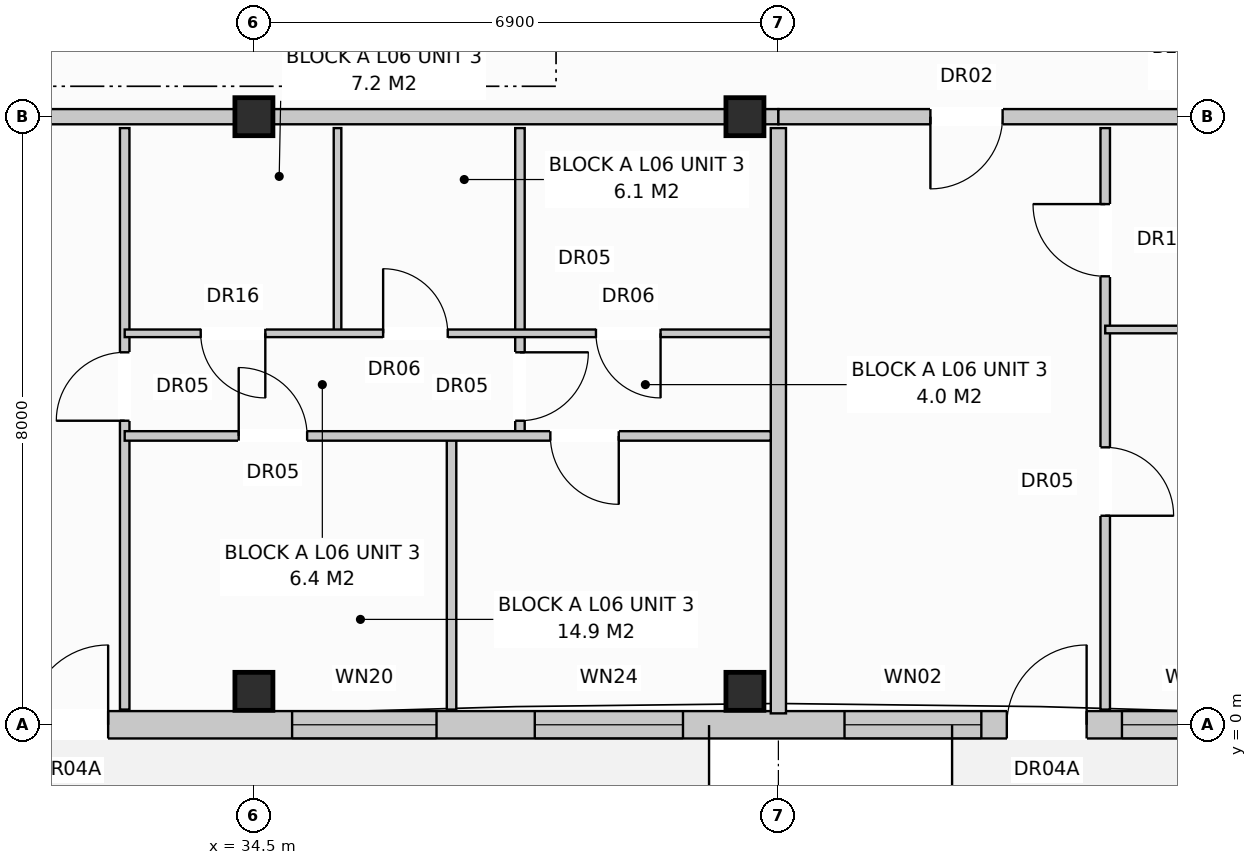
"""IFC4 building model, lengths in metres.
Left out: names, types, materials, properties, quantities, classifications, styles, units other than length and angle.
Written with IfcOpenShell. Run it as: python <this file> out.ifc"""

import sys

from ifc_helpers import new_model, si_unit, direction, frame, frame_2d, origin, origin_with_axes, origin_2d, place, context, subcontext, project, spatial, rectangle, extrude, element, fill, save


model = new_model("IFC4")
c1 = context("Model", 3, precision=1e-05, world=origin(), true_north=direction((0.0, 1.0)))
c2 = subcontext(c1, "Body", "Model", "MODEL_VIEW")
j1 = project(units=[si_unit("LENGTHUNIT", "METRE"), si_unit("PLANEANGLEUNIT", "RADIAN")], contexts=[c1])
p1 = place(None, origin())
s1 = spatial("IfcSite", under=j1, at=p1, CompositionType="ELEMENT")
p2 = place(p1, origin())
s2 = spatial("IfcBuilding", under=s1, at=p2, CompositionType="ELEMENT")
p3 = place(p2, frame((0.0, 0.0, 20.8)))
s3 = spatial("IfcBuildingStorey", under=s2, at=p3, CompositionType="ELEMENT", Elevation=20.8)
for number, where, z_axis, x_axis in (
    (1, (34.5, 0.44, 0.0), (0.0, 0.0, 1.0), (1.0, 0.0, 0.0)),
    (2, (34.5, 8.0, 0.0), (0.0, 0.0, 1.0), (1.0, 0.0, 0.0)),
    (3, (40.96, 0.44, 0.0), (0.0, 0.0, 1.0), (1.0, 0.0, 0.0)),
    (4, (40.96, 8.0, 0.0), (0.0, 0.0, 1.0), (1.0, 0.0, 0.0)),
):
    element("IfcColumn", number, at=place(p3, frame(where, z_axis=z_axis, x_axis=x_axis)), inside=s3, PredefinedType="COLUMN", context=c2, shape_type="SweptSolid", body=[
        extrude(rectangle(XDim=0.5, YDim=0.5, at=origin_2d()), origin(), (0.0, 0.0, 1.0), 3.2),
    ])
p4 = place(p3, frame((0.17, 0.0, 0.0), z_axis=(0.0, 0.0, 1.0), x_axis=(1.0, 0.0, 0.0)))
e5 = element("IfcWall", 5, at=p4, inside=s3, PredefinedType="STANDARD", context=c2, shape_type="SweptSolid", body=[
    extrude(rectangle(XDim=54.86, YDim=0.36, at=frame_2d((27.43, 0.0))), origin(), (0.0, 0.0, 1.0), 2.95),
])
p5 = place(p4, frame((4.862, 0.0, 0.0)))
e6 = element("IfcOpeningElement", 6, at=p5, cuts=e5, PredefinedType="OPENING", context=c2, shape_type="SweptSolid", body=[
    extrude(rectangle(XDim=1.05, YDim=2.12, at=frame_2d((0.525, 1.06))), frame((0.0, 0.192, 0.0), z_axis=(0.0, -1.0, 0.0), x_axis=(1.0, 0.0, 0.0)), (0.0, 0.0, 1.0), 0.384),
])
p6 = place(p4, frame((15.262, 0.0, 0.0)))
e7 = element("IfcOpeningElement", 7, at=p6, cuts=e5, PredefinedType="OPENING", context=c2, shape_type="SweptSolid", body=[
    extrude(rectangle(XDim=1.05, YDim=2.12, at=frame_2d((0.525, 1.06))), frame((0.0, 0.192, 0.0), z_axis=(0.0, -1.0, 0.0), x_axis=(1.0, 0.0, 0.0)), (0.0, 0.0, 1.0), 0.384),
])
p7 = place(p4, frame((31.362, 0.0, 0.0)))
e8 = element("IfcOpeningElement", 8, at=p7, cuts=e5, PredefinedType="OPENING", context=c2, shape_type="SweptSolid", body=[
    extrude(rectangle(XDim=1.05, YDim=2.12, at=frame_2d((0.525, 1.06))), frame((0.0, 0.192, 0.0), z_axis=(0.0, -1.0, 0.0), x_axis=(1.0, 0.0, 0.0)), (0.0, 0.0, 1.0), 0.384),
])
p8 = place(p4, frame((44.235, 0.0, 0.0)))
e9 = element("IfcOpeningElement", 9, at=p8, cuts=e5, PredefinedType="OPENING", context=c2, shape_type="SweptSolid", body=[
    extrude(rectangle(XDim=1.05, YDim=2.12, at=frame_2d((0.525, 1.06))), frame((0.0, 0.192, 0.0), z_axis=(0.0, -1.0, 0.0), x_axis=(1.0, 0.0, 0.0)), (0.0, 0.0, 1.0), 0.384),
])
p9 = place(p4, frame((2.1, 0.0, 0.8)))
e10 = element("IfcOpeningElement", 10, at=p9, cuts=e5, PredefinedType="OPENING", context=c2, shape_type="SweptSolid", body=[
    extrude(rectangle(XDim=1.8, YDim=1.7, at=frame_2d((0.9, 0.85))), frame((0.0, 0.192, 0.0), z_axis=(0.0, -1.0, 0.0), x_axis=(1.0, 0.0, 0.0)), (0.0, 0.0, 1.0), 0.384),
])
p10 = place(p4, frame((7.75, 0.0, 0.72)))
e11 = element("IfcOpeningElement", 11, at=p10, cuts=e5, PredefinedType="OPENING", context=c2, shape_type="SweptSolid", body=[
    extrude(rectangle(XDim=1.9, YDim=1.85, at=frame_2d((0.95, 0.925))), frame((0.0, 0.192, 0.0), z_axis=(0.0, -1.0, 0.0), x_axis=(1.0, 0.0, 0.0)), (0.0, 0.0, 1.0), 0.384),
])
p11 = place(p4, frame((11.8, 0.0, 0.72)))
e12 = element("IfcOpeningElement", 12, at=p11, cuts=e5, PredefinedType="OPENING", context=c2, shape_type="SweptSolid", body=[
    extrude(rectangle(XDim=1.1, YDim=1.5, at=frame_2d((0.55, 0.75))), frame((0.0, 0.192, 0.0), z_axis=(0.0, -1.0, 0.0), x_axis=(1.0, 0.0, 0.0)), (0.0, 0.0, 1.0), 0.384),
])
p12 = place(p4, frame((17.6, 0.0, 0.8)))
e13 = element("IfcOpeningElement", 13, at=p12, cuts=e5, PredefinedType="OPENING", context=c2, shape_type="SweptSolid", body=[
    extrude(rectangle(XDim=1.8, YDim=1.7, at=frame_2d((0.9, 0.85))), frame((0.0, 0.192, 0.0), z_axis=(0.0, -1.0, 0.0), x_axis=(1.0, 0.0, 0.0)), (0.0, 0.0, 1.0), 0.384),
])
p13 = place(p4, frame((21.55, 0.0, 0.72)))
e14 = element("IfcOpeningElement", 14, at=p13, cuts=e5, PredefinedType="OPENING", context=c2, shape_type="SweptSolid", body=[
    extrude(rectangle(XDim=1.9, YDim=1.85, at=frame_2d((0.95, 0.925))), frame((0.0, 0.192, 0.0), z_axis=(0.0, -1.0, 0.0), x_axis=(1.0, 0.0, 0.0)), (0.0, 0.0, 1.0), 0.384),
])
p14 = place(p4, frame((25.35, 0.0, 0.72)))
e15 = element("IfcOpeningElement", 15, at=p14, cuts=e5, PredefinedType="OPENING", context=c2, shape_type="SweptSolid", body=[
    extrude(rectangle(XDim=1.1, YDim=1.5, at=frame_2d((0.55, 0.75))), frame((0.0, 0.192, 0.0), z_axis=(0.0, -1.0, 0.0), x_axis=(1.0, 0.0, 0.0)), (0.0, 0.0, 1.0), 0.384),
])
p15 = place(p4, frame((29.2, 0.0, 0.8)))
e16 = element("IfcOpeningElement", 16, at=p15, cuts=e5, PredefinedType="OPENING", context=c2, shape_type="SweptSolid", body=[
    extrude(rectangle(XDim=1.8, YDim=1.7, at=frame_2d((0.9, 0.85))), frame((0.0, 0.192, 0.0), z_axis=(0.0, -1.0, 0.0), x_axis=(1.0, 0.0, 0.0)), (0.0, 0.0, 1.0), 0.384),
])
p16 = place(p4, frame((34.833, 0.0, 0.72)))
e17 = element("IfcOpeningElement", 17, at=p16, cuts=e5, PredefinedType="OPENING", context=c2, shape_type="SweptSolid", body=[
    extrude(rectangle(XDim=1.9, YDim=1.85, at=frame_2d((0.95, 0.925))), frame((0.0, 0.192, 0.0), z_axis=(0.0, -1.0, 0.0), x_axis=(1.0, 0.0, 0.0)), (0.0, 0.0, 1.0), 0.384),
])
p17 = place(p4, frame((38.025, 0.0, 0.8)))
e18 = element("IfcOpeningElement", 18, at=p17, cuts=e5, PredefinedType="OPENING", context=c2, shape_type="SweptSolid", body=[
    extrude(rectangle(XDim=1.95, YDim=1.65, at=frame_2d((0.975, 0.825))), frame((0.0, 0.192, 0.0), z_axis=(0.0, -1.0, 0.0), x_axis=(1.0, 0.0, 0.0)), (0.0, 0.0, 1.0), 0.384),
])
p18 = place(p4, frame((42.1, 0.0, 0.8)))
e19 = element("IfcOpeningElement", 19, at=p18, cuts=e5, PredefinedType="OPENING", context=c2, shape_type="SweptSolid", body=[
    extrude(rectangle(XDim=1.8, YDim=1.7, at=frame_2d((0.9, 0.85))), frame((0.0, 0.192, 0.0), z_axis=(0.0, -1.0, 0.0), x_axis=(1.0, 0.0, 0.0)), (0.0, 0.0, 1.0), 0.384),
])
p19 = place(p4, frame((45.75, 0.0, 0.72)))
e20 = element("IfcOpeningElement", 20, at=p19, cuts=e5, PredefinedType="OPENING", context=c2, shape_type="SweptSolid", body=[
    extrude(rectangle(XDim=1.9, YDim=1.85, at=frame_2d((0.95, 0.925))), frame((0.0, 0.192, 0.0), z_axis=(0.0, -1.0, 0.0), x_axis=(1.0, 0.0, 0.0)), (0.0, 0.0, 1.0), 0.384),
])
p20 = place(p4, frame((49.125, 0.0, 0.8)))
e21 = element("IfcOpeningElement", 21, at=p20, cuts=e5, PredefinedType="OPENING", context=c2, shape_type="SweptSolid", body=[
    extrude(rectangle(XDim=1.95, YDim=1.65, at=frame_2d((0.975, 0.825))), frame((0.0, 0.192, 0.0), z_axis=(0.0, -1.0, 0.0), x_axis=(1.0, 0.0, 0.0)), (0.0, 0.0, 1.0), 0.384),
])
p21 = place(p4, frame((52.415, 0.0, 0.8)))
e22 = element("IfcOpeningElement", 22, at=p21, cuts=e5, PredefinedType="OPENING", context=c2, shape_type="SweptSolid", body=[
    extrude(rectangle(XDim=1.8, YDim=1.7, at=frame_2d((0.9, 0.85))), frame((0.0, 0.192, 0.0), z_axis=(0.0, -1.0, 0.0), x_axis=(1.0, 0.0, 0.0)), (0.0, 0.0, 1.0), 0.384),
])
p22 = place(p3, frame((41.4, 7.85, 0.0), z_axis=(0.0, 0.0, 1.0), x_axis=(0.0, -1.0, 0.0)))
e23 = element("IfcWall", 23, at=p22, inside=s3, PredefinedType="PARTITIONING", context=c2, shape_type="SweptSolid", body=[
    extrude(rectangle(XDim=7.7, YDim=0.2, at=frame_2d((3.85, 0.0))), origin(), (0.0, 0.0, 1.0), 2.95),
])
p23 = place(p3, frame((27.6, 8.0, 0.0), z_axis=(0.0, 0.0, 1.0), x_axis=(1.0, 0.0, 0.0)))
e24 = element("IfcWall", 24, at=p23, inside=s3, PredefinedType="PARTITIONING", context=c2, shape_type="SweptSolid", body=[
    extrude(rectangle(XDim=13.8, YDim=0.2, at=frame_2d((6.9, 0.0))), origin(), (0.0, 0.0, 1.0), 2.39),
])
p24 = place(p23, frame((2.4, 0.0, 0.0)))
e25 = element("IfcOpeningElement", 25, at=p24, cuts=e24, PredefinedType="OPENING", context=c2, shape_type="SweptSolid", body=[
    extrude(rectangle(XDim=0.95, YDim=2.15, at=frame_2d((0.475, 1.075))), frame((0.0, 0.112, 0.0), z_axis=(0.0, -1.0, 0.0), x_axis=(1.0, 0.0, 0.0)), (0.0, 0.0, 1.0), 0.224),
])
p25 = place(p3, frame((32.8, 7.85, 0.0), z_axis=(0.0, 0.0, 1.0), x_axis=(0.0, -1.0, 0.0)))
e26 = element("IfcWall", 26, at=p25, inside=s3, PredefinedType="PARTITIONING", context=c2, shape_type="SweptSolid", body=[
    extrude(rectangle(XDim=7.65, YDim=0.125, at=frame_2d((3.825, 0.0))), origin(), (0.0, 0.0, 1.0), 2.95),
])
p26 = place(p25, frame((2.95, 0.0, 0.0)))
e27 = element("IfcOpeningElement", 27, at=p26, cuts=e26, PredefinedType="OPENING", context=c2, shape_type="SweptSolid", body=[
    extrude(rectangle(XDim=0.9, YDim=2.1, at=frame_2d((0.45, 1.05))), frame((0.0, 0.074, 0.0), z_axis=(0.0, -1.0, 0.0), x_axis=(1.0, 0.0, 0.0)), (0.0, 0.0, 1.0), 0.149),
])
p27 = place(p3, frame((35.6, 7.85, 0.0), z_axis=(0.0, 0.0, 1.0), x_axis=(0.0, -1.0, 0.0)))
e28 = element("IfcWall", 28, at=p27, inside=s3, PredefinedType="PARTITIONING", context=c2, shape_type="SweptSolid", body=[
    extrude(rectangle(XDim=2.7, YDim=0.1, at=frame_2d((1.35, 0.0))), origin(), (0.0, 0.0, 1.0), 2.95),
])
p28 = place(p3, frame((38.0, 7.85, 0.0), z_axis=(0.0, 0.0, 1.0), x_axis=(0.0, -1.0, 0.0)))
e29 = element("IfcWall", 29, at=p28, inside=s3, PredefinedType="PARTITIONING", context=c2, shape_type="SweptSolid", body=[
    extrude(rectangle(XDim=4.05, YDim=0.125, at=frame_2d((2.025, 0.0))), origin(), (0.0, 0.0, 1.0), 2.95),
])
p29 = place(p28, frame((2.95, 0.0, 0.0)))
e30 = element("IfcOpeningElement", 30, at=p29, cuts=e29, PredefinedType="OPENING", context=c2, shape_type="SweptSolid", body=[
    extrude(rectangle(XDim=0.9, YDim=2.1, at=frame_2d((0.45, 1.05))), frame((0.0, 0.074, 0.0), z_axis=(0.0, -1.0, 0.0), x_axis=(1.0, 0.0, 0.0)), (0.0, 0.0, 1.0), 0.149),
])
p30 = place(p3, frame((37.1, 3.8, 0.0), z_axis=(0.0, 0.0, 1.0), x_axis=(0.0, -1.0, 0.0)))
e31 = element("IfcWall", 31, at=p30, inside=s3, PredefinedType="PARTITIONING", context=c2, shape_type="SweptSolid", body=[
    extrude(rectangle(XDim=3.6, YDim=0.125, at=frame_2d((1.8, 0.0))), origin(), (0.0, 0.0, 1.0), 2.95),
])
p31 = place(p3, frame((32.8, 5.15, 0.0), z_axis=(0.0, 0.0, 1.0), x_axis=(1.0, 0.0, 0.0)))
e32 = element("IfcWall", 32, at=p31, inside=s3, PredefinedType="PARTITIONING", context=c2, shape_type="SweptSolid", body=[
    extrude(rectangle(XDim=8.5, YDim=0.1, at=frame_2d((4.25, 0.0))), origin(), (0.0, 0.0, 1.0), 2.95),
])
p32 = place(p31, frame((1.0, 0.0, 0.0)))
e33 = element("IfcOpeningElement", 33, at=p32, cuts=e32, PredefinedType="OPENING", context=c2, shape_type="SweptSolid", body=[
    extrude(rectangle(XDim=0.85, YDim=2.1, at=frame_2d((0.425, 1.05))), frame((0.0, 0.062, 0.0), z_axis=(0.0, -1.0, 0.0), x_axis=(1.0, 0.0, 0.0)), (0.0, 0.0, 1.0), 0.124),
])
p33 = place(p31, frame((3.4, 0.0, 0.0)))
e34 = element("IfcOpeningElement", 34, at=p33, cuts=e32, PredefinedType="OPENING", context=c2, shape_type="SweptSolid", body=[
    extrude(rectangle(XDim=0.85, YDim=2.05, at=frame_2d((0.425, 1.025))), frame((0.0, 0.062, 0.0), z_axis=(0.0, -1.0, 0.0), x_axis=(1.0, 0.0, 0.0)), (0.0, 0.0, 1.0), 0.124),
])
p34 = place(p31, frame((6.2, 0.0, 0.0)))
e35 = element("IfcOpeningElement", 35, at=p34, cuts=e32, PredefinedType="OPENING", context=c2, shape_type="SweptSolid", body=[
    extrude(rectangle(XDim=0.85, YDim=2.05, at=frame_2d((0.425, 1.025))), frame((0.0, 0.062, 0.0), z_axis=(0.0, -1.0, 0.0), x_axis=(1.0, 0.0, 0.0)), (0.0, 0.0, 1.0), 0.124),
])
p35 = place(p3, frame((32.8, 3.8, 0.0), z_axis=(0.0, 0.0, 1.0), x_axis=(1.0, 0.0, 0.0)))
e36 = element("IfcWall", 36, at=p35, inside=s3, PredefinedType="PARTITIONING", context=c2, shape_type="SweptSolid", body=[
    extrude(rectangle(XDim=8.5, YDim=0.125, at=frame_2d((4.25, 0.0))), origin(), (0.0, 0.0, 1.0), 2.95),
])
p36 = place(p35, frame((1.5, 0.0, 0.0)))
e37 = element("IfcOpeningElement", 37, at=p36, cuts=e36, PredefinedType="OPENING", context=c2, shape_type="SweptSolid", body=[
    extrude(rectangle(XDim=0.9, YDim=2.1, at=frame_2d((0.45, 1.05))), frame((0.0, 0.074, 0.0), z_axis=(0.0, -1.0, 0.0), x_axis=(1.0, 0.0, 0.0)), (0.0, 0.0, 1.0), 0.149),
])
p37 = place(p35, frame((5.6, 0.0, 0.0)))
e38 = element("IfcOpeningElement", 38, at=p37, cuts=e36, PredefinedType="OPENING", context=c2, shape_type="SweptSolid", body=[
    extrude(rectangle(XDim=0.9, YDim=2.1, at=frame_2d((0.45, 1.05))), frame((0.0, 0.074, 0.0), z_axis=(0.0, -1.0, 0.0), x_axis=(1.0, 0.0, 0.0)), (0.0, 0.0, 1.0), 0.149),
])
p38 = place(p3, frame((41.4, 8.0, 0.0), z_axis=(0.0, 0.0, 1.0), x_axis=(1.0, 0.0, 0.0)))
e39 = element("IfcWall", 39, at=p38, inside=s3, PredefinedType="PARTITIONING", context=c2, shape_type="SweptSolid", body=[
    extrude(rectangle(XDim=6.9, YDim=0.2, at=frame_2d((3.45, 0.0))), origin(), (0.0, 0.0, 1.0), 2.39),
])
p39 = place(p38, frame((2.0, 0.0, 0.0)))
e40 = element("IfcOpeningElement", 40, at=p39, cuts=e39, PredefinedType="OPENING", context=c2, shape_type="SweptSolid", body=[
    extrude(rectangle(XDim=0.95, YDim=2.15, at=frame_2d((0.475, 1.075))), frame((0.0, 0.112, 0.0), z_axis=(0.0, -1.0, 0.0), x_axis=(1.0, 0.0, 0.0)), (0.0, 0.0, 1.0), 0.224),
])
p40 = place(p3, frame((45.7, 7.85, 0.0), z_axis=(0.0, 0.0, 1.0), x_axis=(0.0, -1.0, 0.0)))
e41 = element("IfcWall", 41, at=p40, inside=s3, PredefinedType="PARTITIONING", context=c2, shape_type="SweptSolid", body=[
    extrude(rectangle(XDim=7.65, YDim=0.125, at=frame_2d((3.825, 0.0))), origin(), (0.0, 0.0, 1.0), 2.95),
])
p41 = place(p40, frame((1.0, 0.0, 0.0)))
e42 = element("IfcOpeningElement", 42, at=p41, cuts=e41, PredefinedType="OPENING", context=c2, shape_type="SweptSolid", body=[
    extrude(rectangle(XDim=0.95, YDim=2.1, at=frame_2d((0.475, 1.05))), frame((0.0, 0.074, 0.0), z_axis=(0.0, -1.0, 0.0), x_axis=(1.0, 0.0, 0.0)), (0.0, 0.0, 1.0), 0.149),
])
p42 = place(p40, frame((4.2, 0.0, 0.0)))
e43 = element("IfcOpeningElement", 43, at=p42, cuts=e41, PredefinedType="OPENING", context=c2, shape_type="SweptSolid", body=[
    extrude(rectangle(XDim=0.9, YDim=2.1, at=frame_2d((0.45, 1.05))), frame((0.0, 0.074, 0.0), z_axis=(0.0, -1.0, 0.0), x_axis=(1.0, 0.0, 0.0)), (0.0, 0.0, 1.0), 0.149),
])
p43 = place(p3, frame((45.7, 5.2, 0.0), z_axis=(0.0, 0.0, 1.0), x_axis=(1.0, 0.0, 0.0)))
e44 = element("IfcWall", 44, at=p43, inside=s3, PredefinedType="PARTITIONING", context=c2, shape_type="SweptSolid", body=[
    extrude(rectangle(XDim=2.5, YDim=0.1, at=frame_2d((1.25, 0.0))), origin(), (0.0, 0.0, 1.0), 2.95),
])
p44 = place(p7, origin_with_axes())
e45 = element("IfcDoor", 45, at=p44, inside=s3, OperationType="SINGLE_SWING_RIGHT", PredefinedType="DOOR", context=c2, shape_type="SweptSolid", body=[
    extrude(rectangle(XDim=1.05, YDim=2.12, at=frame_2d((0.525, 1.06))), frame((0.0, 0.025, 0.0), z_axis=(0.0, -1.0, 0.0), x_axis=(1.0, 0.0, 0.0)), (0.0, 0.0, 1.0), 0.05),
])
fill(e8, e45)
p45 = place(p8, origin_with_axes())
e46 = element("IfcDoor", 46, at=p45, inside=s3, OperationType="SINGLE_SWING_RIGHT", PredefinedType="DOOR", context=c2, shape_type="SweptSolid", body=[
    extrude(rectangle(XDim=1.05, YDim=2.12, at=frame_2d((0.525, 1.06))), frame((0.0, 0.025, 0.0), z_axis=(0.0, -1.0, 0.0), x_axis=(1.0, 0.0, 0.0)), (0.0, 0.0, 1.0), 0.05),
])
fill(e9, e46)
p46 = place(p16, origin_with_axes())
e47 = element("IfcWindow", 47, at=p46, inside=s3, PartitioningType="SINGLE_PANEL", PredefinedType="WINDOW", context=c2, shape_type="SweptSolid", body=[
    extrude(rectangle(XDim=1.9, YDim=1.85, at=frame_2d((0.95, 0.925))), frame((0.0, 0.03, 0.0), z_axis=(0.0, -1.0, 0.0), x_axis=(1.0, 0.0, 0.0)), (0.0, 0.0, 1.0), 0.06),
])
fill(e17, e47)
p47 = place(p17, origin_with_axes())
e48 = element("IfcWindow", 48, at=p47, inside=s3, PartitioningType="SINGLE_PANEL", PredefinedType="WINDOW", context=c2, shape_type="SweptSolid", body=[
    extrude(rectangle(XDim=1.95, YDim=1.65, at=frame_2d((0.975, 0.825))), frame((0.0, 0.03, 0.0), z_axis=(0.0, -1.0, 0.0), x_axis=(1.0, 0.0, 0.0)), (0.0, 0.0, 1.0), 0.06),
])
fill(e18, e48)
p48 = place(p18, origin_with_axes())
e49 = element("IfcWindow", 49, at=p48, inside=s3, PartitioningType="SINGLE_PANEL", PredefinedType="WINDOW", context=c2, shape_type="SweptSolid", body=[
    extrude(rectangle(XDim=1.8, YDim=1.7, at=frame_2d((0.9, 0.85))), frame((0.0, 0.03, 0.0), z_axis=(0.0, -1.0, 0.0), x_axis=(1.0, 0.0, 0.0)), (0.0, 0.0, 1.0), 0.06),
])
fill(e19, e49)
p49 = place(p19, origin_with_axes())
e50 = element("IfcWindow", 50, at=p49, inside=s3, PartitioningType="SINGLE_PANEL", PredefinedType="WINDOW", context=c2, shape_type="SweptSolid", body=[
    extrude(rectangle(XDim=1.9, YDim=1.85, at=frame_2d((0.95, 0.925))), frame((0.0, 0.03, 0.0), z_axis=(0.0, -1.0, 0.0), x_axis=(1.0, 0.0, 0.0)), (0.0, 0.0, 1.0), 0.06),
])
fill(e20, e50)
p50 = place(p26, frame((0.9, 0.0, 0.0), z_axis=(0.0, 0.0, 1.0), x_axis=(-1.0, 0.0, 0.0)))
e51 = element("IfcDoor", 51, at=p50, inside=s3, OperationType="SINGLE_SWING_RIGHT", PredefinedType="DOOR", context=c2, shape_type="SweptSolid", body=[
    extrude(rectangle(XDim=0.9, YDim=2.1, at=frame_2d((0.45, 1.05))), frame((0.0, 0.025, 0.0), z_axis=(0.0, -1.0, 0.0), x_axis=(1.0, 0.0, 0.0)), (0.0, 0.0, 1.0), 0.05),
])
fill(e27, e51)
p51 = place(p29, origin_with_axes())
e52 = element("IfcDoor", 52, at=p51, inside=s3, OperationType="SINGLE_SWING_LEFT", PredefinedType="DOOR", context=c2, shape_type="SweptSolid", body=[
    extrude(rectangle(XDim=0.9, YDim=2.1, at=frame_2d((0.45, 1.05))), frame((0.0, 0.025, 0.0), z_axis=(0.0, -1.0, 0.0), x_axis=(1.0, 0.0, 0.0)), (0.0, 0.0, 1.0), 0.05),
])
fill(e30, e52)
p52 = place(p32, frame((0.85, 0.0, 0.0), z_axis=(0.0, 0.0, 1.0), x_axis=(-1.0, 0.0, 0.0)))
e53 = element("IfcDoor", 53, at=p52, inside=s3, OperationType="SINGLE_SWING_RIGHT", PredefinedType="DOOR", context=c2, shape_type="SweptSolid", body=[
    extrude(rectangle(XDim=0.85, YDim=2.1, at=frame_2d((0.425, 1.05))), frame((0.0, 0.025, 0.0), z_axis=(0.0, -1.0, 0.0), x_axis=(1.0, 0.0, 0.0)), (0.0, 0.0, 1.0), 0.05),
])
fill(e33, e53)
p53 = place(p33, origin_with_axes())
e54 = element("IfcDoor", 54, at=p53, inside=s3, OperationType="SINGLE_SWING_LEFT", PredefinedType="DOOR", context=c2, shape_type="SweptSolid", body=[
    extrude(rectangle(XDim=0.85, YDim=2.05, at=frame_2d((0.425, 1.025))), frame((0.0, 0.025, 0.0), z_axis=(0.0, -1.0, 0.0), x_axis=(1.0, 0.0, 0.0)), (0.0, 0.0, 1.0), 0.05),
])
fill(e34, e54)
p54 = place(p34, frame((0.85, 0.0, 0.0), z_axis=(0.0, 0.0, 1.0), x_axis=(-1.0, 0.0, 0.0)))
e55 = element("IfcDoor", 55, at=p54, inside=s3, OperationType="SINGLE_SWING_RIGHT", PredefinedType="DOOR", context=c2, shape_type="SweptSolid", body=[
    extrude(rectangle(XDim=0.85, YDim=2.05, at=frame_2d((0.425, 1.025))), frame((0.0, 0.025, 0.0), z_axis=(0.0, -1.0, 0.0), x_axis=(1.0, 0.0, 0.0)), (0.0, 0.0, 1.0), 0.05),
])
fill(e35, e55)
p55 = place(p36, origin_with_axes())
e56 = element("IfcDoor", 56, at=p55, inside=s3, OperationType="SINGLE_SWING_LEFT", PredefinedType="DOOR", context=c2, shape_type="SweptSolid", body=[
    extrude(rectangle(XDim=0.9, YDim=2.1, at=frame_2d((0.45, 1.05))), frame((0.0, 0.025, 0.0), z_axis=(0.0, -1.0, 0.0), x_axis=(1.0, 0.0, 0.0)), (0.0, 0.0, 1.0), 0.05),
])
fill(e37, e56)
p56 = place(p37, frame((0.9, 0.0, 0.0), z_axis=(0.0, 0.0, 1.0), x_axis=(-1.0, 0.0, 0.0)))
e57 = element("IfcDoor", 57, at=p56, inside=s3, OperationType="SINGLE_SWING_RIGHT", PredefinedType="DOOR", context=c2, shape_type="SweptSolid", body=[
    extrude(rectangle(XDim=0.9, YDim=2.1, at=frame_2d((0.45, 1.05))), frame((0.0, 0.025, 0.0), z_axis=(0.0, -1.0, 0.0), x_axis=(1.0, 0.0, 0.0)), (0.0, 0.0, 1.0), 0.05),
])
fill(e38, e57)
p57 = place(p39, frame((0.95, 0.0, 0.0), z_axis=(0.0, 0.0, 1.0), x_axis=(-1.0, 0.0, 0.0)))
e58 = element("IfcDoor", 58, at=p57, inside=s3, OperationType="SINGLE_SWING_LEFT", PredefinedType="DOOR", context=c2, shape_type="SweptSolid", body=[
    extrude(rectangle(XDim=0.95, YDim=2.15, at=frame_2d((0.475, 1.075))), frame((0.0, 0.025, 0.0), z_axis=(0.0, -1.0, 0.0), x_axis=(1.0, 0.0, 0.0)), (0.0, 0.0, 1.0), 0.05),
])
fill(e40, e58)
p58 = place(p41, frame((0.95, 0.0, 0.0), z_axis=(0.0, 0.0, 1.0), x_axis=(-1.0, 0.0, 0.0)))
e59 = element("IfcDoor", 59, at=p58, inside=s3, OperationType="SINGLE_SWING_LEFT", PredefinedType="DOOR", context=c2, shape_type="SweptSolid", body=[
    extrude(rectangle(XDim=0.95, YDim=2.1, at=frame_2d((0.475, 1.05))), frame((0.0, 0.025, 0.0), z_axis=(0.0, -1.0, 0.0), x_axis=(1.0, 0.0, 0.0)), (0.0, 0.0, 1.0), 0.05),
])
fill(e42, e59)
p59 = place(p42, origin_with_axes())
e60 = element("IfcDoor", 60, at=p59, inside=s3, OperationType="SINGLE_SWING_RIGHT", PredefinedType="DOOR", context=c2, shape_type="SweptSolid", body=[
    extrude(rectangle(XDim=0.9, YDim=2.1, at=frame_2d((0.45, 1.05))), frame((0.0, 0.025, 0.0), z_axis=(0.0, -1.0, 0.0), x_axis=(1.0, 0.0, 0.0)), (0.0, 0.0, 1.0), 0.05),
])
fill(e43, e60)
save(model, sys.argv[1])
